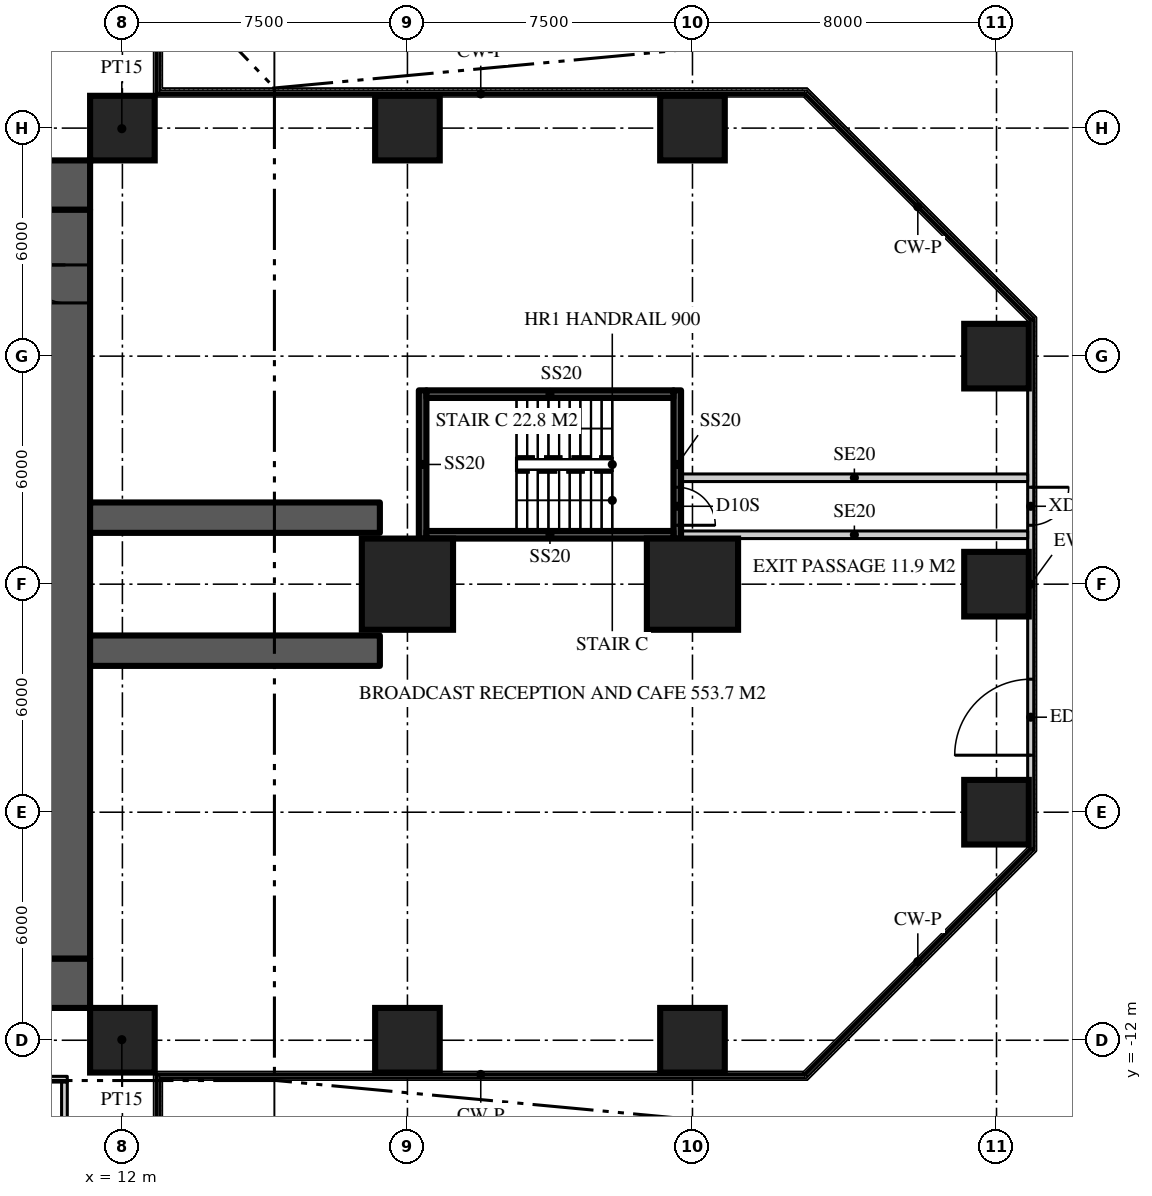
"""IFC4 building model, lengths in metres.
Left out: names, types, materials, properties, quantities, classifications, styles, units other than length and angle.
Written with IfcOpenShell. Run it as: python <this file> out.ifc"""

import sys

from ifc_helpers import new_model, si_unit, direction, frame, frame_2d, origin, origin_2d, place, context, subcontext, project, spatial, rectangle, extrude, element, fill, save


model = new_model("IFC4")
c1 = context("Model", 3, precision=1e-05, world=origin(), true_north=direction((0.0, 1.0)))
c2 = subcontext(c1, "Body", "Model", "MODEL_VIEW")
j1 = project(units=[si_unit("LENGTHUNIT", "METRE"), si_unit("PLANEANGLEUNIT", "RADIAN")], contexts=[c1])
p1 = place(None, origin())
s1 = spatial("IfcSite", under=j1, at=p1, CompositionType="ELEMENT")
p2 = place(p1, origin())
s2 = spatial("IfcBuilding", under=s1, at=p2, CompositionType="ELEMENT")
p3 = place(p2, origin())
s3 = spatial("IfcBuildingStorey", under=s2, at=p3, CompositionType="ELEMENT", Elevation=0.0)
p4 = place(p3, frame((-11.15, 10.5, 0.0), z_axis=(0.0, 0.0, 1.0), x_axis=(1.0, 0.0, 0.0)))
e1 = element("IfcWall", 1, at=p4, inside=s3, PredefinedType="SHEAR", context=c2, shape_type="SweptSolid", body=[
    extrude(rectangle(XDim=22.3, YDim=1.3, at=frame_2d((11.15, 0.0))), origin(), (0.0, 0.0, 1.0), 7.0),
])
p5 = place(p4, frame((4.25, 0.0, 0.0)))
e2 = element("IfcOpeningElement", 2, at=p5, cuts=e1, PredefinedType="OPENING", context=c2, shape_type="SweptSolid", body=[
    extrude(rectangle(XDim=1.8, YDim=2.2, at=frame_2d((0.9, 1.1))), frame((0.0, 0.66, 0.0), z_axis=(0.0, -1.0, 0.0), x_axis=(1.0, 0.0, 0.0)), (0.0, 0.0, 1.0), 1.32),
])
p6 = place(p4, frame((16.25, 0.0, 0.0)))
e3 = element("IfcOpeningElement", 3, at=p6, cuts=e1, PredefinedType="OPENING", context=c2, shape_type="SweptSolid", body=[
    extrude(rectangle(XDim=1.8, YDim=2.2, at=frame_2d((0.9, 1.1))), frame((0.0, 0.66, 0.0), z_axis=(0.0, -1.0, 0.0), x_axis=(1.0, 0.0, 0.0)), (0.0, 0.0, 1.0), 1.32),
])
p7 = place(p3, frame((11.15, -10.5, 0.0), z_axis=(0.0, 0.0, 1.0), x_axis=(-1.0, 0.0, 0.0)))
e4 = element("IfcWall", 4, at=p7, inside=s3, PredefinedType="SHEAR", context=c2, shape_type="SweptSolid", body=[
    extrude(rectangle(XDim=22.3, YDim=1.3, at=frame_2d((11.15, 0.0))), origin(), (0.0, 0.0, 1.0), 7.0),
])
p8 = place(p7, frame((16.25, 0.0, 0.0)))
e5 = element("IfcOpeningElement", 5, at=p8, cuts=e4, PredefinedType="OPENING", context=c2, shape_type="SweptSolid", body=[
    extrude(rectangle(XDim=1.8, YDim=2.2, at=frame_2d((0.9, 1.1))), frame((0.0, 0.66, 0.0), z_axis=(0.0, -1.0, 0.0), x_axis=(1.0, 0.0, 0.0)), (0.0, 0.0, 1.0), 1.32),
])
p9 = place(p7, frame((4.25, 0.0, 0.0)))
e6 = element("IfcOpeningElement", 6, at=p9, cuts=e4, PredefinedType="OPENING", context=c2, shape_type="SweptSolid", body=[
    extrude(rectangle(XDim=1.8, YDim=2.2, at=frame_2d((0.9, 1.1))), frame((0.0, 0.66, 0.0), z_axis=(0.0, -1.0, 0.0), x_axis=(1.0, 0.0, 0.0)), (0.0, 0.0, 1.0), 1.32),
])
p10 = place(p3, frame((10.5, -9.85, 0.0), z_axis=(0.0, 0.0, 1.0), x_axis=(0.0, 1.0, 0.0)))
e7 = element("IfcWall", 7, at=p10, inside=s3, PredefinedType="SHEAR", context=c2, shape_type="SweptSolid", body=[
    extrude(rectangle(XDim=19.7, YDim=1.3, at=frame_2d((9.85, 0.0))), origin(), (0.0, 0.0, 1.0), 7.0),
])
p11 = place(p10, frame((17.25, 0.0, 0.0)))
e8 = element("IfcOpeningElement", 8, at=p11, cuts=e7, PredefinedType="OPENING", context=c2, shape_type="SweptSolid", body=[
    extrude(rectangle(XDim=1.0, YDim=2.2, at=frame_2d((0.5, 1.1))), frame((0.0, 0.66, 0.0), z_axis=(0.0, -1.0, 0.0), x_axis=(1.0, 0.0, 0.0)), (0.0, 0.0, 1.0), 1.32),
])
for number, where, z_axis, x_axis in (
    (9, (11.15, -1.75, 0.0), (0.0, 0.0, 1.0), (1.0, 0.0, 0.0)),
    (10, (11.15, 1.75, 0.0), (0.0, 0.0, 1.0), (1.0, 0.0, 0.0)),
):
    element("IfcWall", number, at=place(p3, frame(where, z_axis=z_axis, x_axis=x_axis)), inside=s3, PredefinedType="SHEAR", context=c2, shape_type="SweptSolid", body=[
        extrude(rectangle(XDim=7.625, YDim=0.8, at=frame_2d((3.812, 0.0))), origin(), (0.0, 0.0, 1.0), 7.0),
    ])
for number, where, z_axis, x_axis in (
    (11, (12.0, -12.0, 0.0), (0.0, 0.0, 1.0), (1.0, 0.0, 0.0)),
    (12, (19.5, -12.0, 0.0), (0.0, 0.0, 1.0), (1.0, 0.0, 0.0)),
    (13, (27.0, -12.0, 0.0), (0.0, 0.0, 1.0), (1.0, 0.0, 0.0)),
    (14, (35.0, -6.0, 0.0), (0.0, 0.0, 1.0), (1.0, 0.0, 0.0)),
):
    element("IfcColumn", number, at=place(p3, frame(where, z_axis=z_axis, x_axis=x_axis)), inside=s3, PredefinedType="COLUMN", context=c2, shape_type="SweptSolid", body=[
        extrude(rectangle(XDim=1.7, YDim=1.7, at=origin_2d()), origin(), (0.0, 0.0, 1.0), 7.0),
    ])
for number, where, z_axis, x_axis in (
    (15, (19.5, 0.0, 0.0), (0.0, 0.0, 1.0), (1.0, 0.0, 0.0)),
    (16, (27.0, 0.0, 0.0), (0.0, 0.0, 1.0), (1.0, 0.0, 0.0)),
):
    element("IfcColumn", number, at=place(p3, frame(where, z_axis=z_axis, x_axis=x_axis)), inside=s3, PredefinedType="COLUMN", context=c2, shape_type="SweptSolid", body=[
        extrude(rectangle(XDim=2.4, YDim=2.4, at=origin_2d()), origin(), (0.0, 0.0, 1.0), 7.0),
    ])
for number, where, z_axis, x_axis in (
    (17, (35.0, 0.0, 0.0), (0.0, 0.0, 1.0), (1.0, 0.0, 0.0)),
    (18, (35.0, 6.0, 0.0), (0.0, 0.0, 1.0), (1.0, 0.0, 0.0)),
    (19, (12.0, 12.0, 0.0), (0.0, 0.0, 1.0), (1.0, 0.0, 0.0)),
    (20, (19.5, 12.0, 0.0), (0.0, 0.0, 1.0), (1.0, 0.0, 0.0)),
    (21, (27.0, 12.0, 0.0), (0.0, 0.0, 1.0), (1.0, 0.0, 0.0)),
):
    element("IfcColumn", number, at=place(p3, frame(where, z_axis=z_axis, x_axis=x_axis)), inside=s3, PredefinedType="COLUMN", context=c2, shape_type="SweptSolid", body=[
        extrude(rectangle(XDim=1.7, YDim=1.7, at=origin_2d()), origin(), (0.0, 0.0, 1.0), 7.0),
    ])
p12 = place(p3, frame((35.9, -6.958, 0.0), z_axis=(0.0, 0.0, 1.0), x_axis=(0.0, 1.0, 0.0)))
e22 = element("IfcWall", 22, at=p12, inside=s3, PredefinedType="SOLIDWALL", context=c2, shape_type="SweptSolid", body=[
    extrude(rectangle(XDim=13.917, YDim=0.16, at=frame_2d((6.958, 0.0))), origin(), (0.0, 0.0, 1.0), 6.75),
])
p13 = place(p12, frame((2.458, 0.0, 0.0)))
e23 = element("IfcOpeningElement", 23, at=p13, cuts=e22, PredefinedType="OPENING", context=c2, shape_type="SweptSolid", body=[
    extrude(rectangle(XDim=2.0, YDim=2.7, at=frame_2d((1.0, 1.35))), frame((0.0, 0.09, 0.0), z_axis=(0.0, -1.0, 0.0), x_axis=(1.0, 0.0, 0.0)), (0.0, 0.0, 1.0), 0.18),
])
p14 = place(p12, frame((8.509, 0.0, 0.0)))
e24 = element("IfcOpeningElement", 24, at=p14, cuts=e22, PredefinedType="OPENING", context=c2, shape_type="SweptSolid", body=[
    extrude(rectangle(XDim=1.0, YDim=2.2, at=frame_2d((0.5, 1.1))), frame((0.0, 0.09, 0.0), z_axis=(0.0, -1.0, 0.0), x_axis=(1.0, 0.0, 0.0)), (0.0, 0.0, 1.0), 0.18),
])
for number, where, z_axis, x_axis in (
    (25, (11.15, 11.15, 0.0), (0.0, 0.0, 1.0), (0.707, 0.707, 0.0)),
    (26, (11.15, -11.15, 0.0), (0.0, 0.0, 1.0), (0.707, -0.707, 0.0)),
):
    element("IfcWall", number, at=place(p3, frame(where, z_axis=z_axis, x_axis=x_axis)), inside=s3, PredefinedType="PARTITIONING", context=c2, shape_type="SweptSolid", body=[
        extrude(rectangle(XDim=2.362, YDim=0.15, at=frame_2d((1.181, 0.0))), origin(), (0.0, 0.0, 1.0), 6.75),
    ])
p15 = place(p3, frame((19.9, 1.2, 0.0), z_axis=(0.0, 0.0, 1.0), x_axis=(0.0, 1.0, 0.0)))
e27 = element("IfcWall", 27, at=p15, inside=s3, PredefinedType="SOLIDWALL", context=c2, shape_type="SweptSolid", body=[
    extrude(rectangle(XDim=3.9, YDim=0.2, at=frame_2d((1.95, 0.0))), origin(), (0.0, 0.0, 1.0), 6.75),
])
p16 = place(p3, frame((26.6, 5.1, 0.0), z_axis=(0.0, 0.0, 1.0), x_axis=(0.0, -1.0, 0.0)))
e28 = element("IfcWall", 28, at=p16, inside=s3, PredefinedType="SOLIDWALL", context=c2, shape_type="SweptSolid", body=[
    extrude(rectangle(XDim=3.9, YDim=0.2, at=frame_2d((1.95, 0.0))), origin(), (0.0, 0.0, 1.0), 6.75),
])
p17 = place(p16, frame((2.55, 0.0, 0.0)))
e29 = element("IfcOpeningElement", 29, at=p17, cuts=e28, PredefinedType="OPENING", context=c2, shape_type="SweptSolid", body=[
    extrude(rectangle(XDim=1.0, YDim=2.2, at=frame_2d((0.5, 1.1))), frame((0.0, 0.11, 0.0), z_axis=(0.0, -1.0, 0.0), x_axis=(1.0, 0.0, 0.0)), (0.0, 0.0, 1.0), 0.22),
])
for number, where, z_axis, x_axis in (
    (30, (20.0, 1.3, 0.0), (0.0, 0.0, 1.0), (1.0, 0.0, 0.0)),
    (31, (26.5, 5.0, 0.0), (0.0, 0.0, 1.0), (-1.0, 0.0, 0.0)),
):
    element("IfcWall", number, at=place(p3, frame(where, z_axis=z_axis, x_axis=x_axis)), inside=s3, PredefinedType="SOLIDWALL", context=c2, shape_type="SweptSolid", body=[
        extrude(rectangle(XDim=6.5, YDim=0.2, at=frame_2d((3.25, 0.0))), origin(), (0.0, 0.0, 1.0), 6.75),
    ])
for number, where, z_axis, x_axis in (
    (32, (26.7, 1.3, 0.0), (0.0, 0.0, 1.0), (1.0, 0.0, 0.0)),
    (33, (26.7, 2.8, 0.0), (0.0, 0.0, 1.0), (1.0, 0.0, 0.0)),
):
    element("IfcWall", number, at=place(p3, frame(where, z_axis=z_axis, x_axis=x_axis)), inside=s3, PredefinedType="SOLIDWALL", context=c2, shape_type="SweptSolid", body=[
        extrude(rectangle(XDim=9.12, YDim=0.2, at=frame_2d((4.56, 0.0))), origin(), (0.0, 0.0, 1.0), 6.75),
    ])
p18 = place(p3, frame((5.45, -13.025, 0.0), z_axis=(0.0, 0.0, 1.0), x_axis=(1.0, 0.0, 0.0)))
e34 = element("IfcWall", 34, at=p18, inside=s3, PredefinedType="SOLIDWALL", context=c2, shape_type="SweptSolid", body=[
    extrude(rectangle(XDim=5.1, YDim=0.15, at=frame_2d((2.55, 0.0))), origin(), (0.0, 0.0, 1.0), 6.75),
])
p19 = place(p3, frame((10.475, -18.0, 0.0), z_axis=(0.0, 0.0, 1.0), x_axis=(0.0, 1.0, 0.0)))
e35 = element("IfcWall", 35, at=p19, inside=s3, PredefinedType="SOLIDWALL", context=c2, shape_type="SweptSolid", body=[
    extrude(rectangle(XDim=4.9, YDim=0.15, at=frame_2d((2.45, 0.0))), origin(), (0.0, 0.0, 1.0), 6.75),
])
p20 = place(p13, origin())
e36 = element("IfcDoor", 36, at=p20, inside=s3, OperationType="DOUBLE_DOOR_DOUBLE_SWING", PredefinedType="DOOR", context=c2, shape_type="SweptSolid", body=[
    extrude(rectangle(XDim=2.0, YDim=2.7, at=frame_2d((1.0, 1.35))), frame((0.0, 0.025, 0.0), z_axis=(0.0, -1.0, 0.0), x_axis=(1.0, 0.0, 0.0)), (0.0, 0.0, 1.0), 0.05),
])
fill(e23, e36)
p21 = place(p14, frame((1.0, 0.0, 0.0), z_axis=(0.0, 0.0, 1.0), x_axis=(-1.0, 0.0, 0.0)))
e37 = element("IfcDoor", 37, at=p21, inside=s3, OperationType="SINGLE_SWING_LEFT", PredefinedType="DOOR", context=c2, shape_type="SweptSolid", body=[
    extrude(rectangle(XDim=1.0, YDim=2.2, at=frame_2d((0.5, 1.1))), frame((0.0, 0.025, 0.0), z_axis=(0.0, -1.0, 0.0), x_axis=(1.0, 0.0, 0.0)), (0.0, 0.0, 1.0), 0.05),
])
fill(e24, e37)
p22 = place(p11, origin())
e38 = element("IfcDoor", 38, at=p22, inside=s3, OperationType="SINGLE_SWING_RIGHT", PredefinedType="DOOR", context=c2, shape_type="SweptSolid", body=[
    extrude(rectangle(XDim=1.0, YDim=2.2, at=frame_2d((0.5, 1.1))), frame((0.0, 0.025, 0.0), z_axis=(0.0, -1.0, 0.0), x_axis=(1.0, 0.0, 0.0)), (0.0, 0.0, 1.0), 0.05),
])
fill(e8, e38)
p23 = place(p17, origin())
e39 = element("IfcDoor", 39, at=p23, inside=s3, OperationType="SINGLE_SWING_RIGHT", PredefinedType="DOOR", context=c2, shape_type="SweptSolid", body=[
    extrude(rectangle(XDim=1.0, YDim=2.2, at=frame_2d((0.5, 1.1))), frame((0.0, 0.025, 0.0), z_axis=(0.0, -1.0, 0.0), x_axis=(1.0, 0.0, 0.0)), (0.0, 0.0, 1.0), 0.05),
])
fill(e29, e39)
save(model, sys.argv[1])
